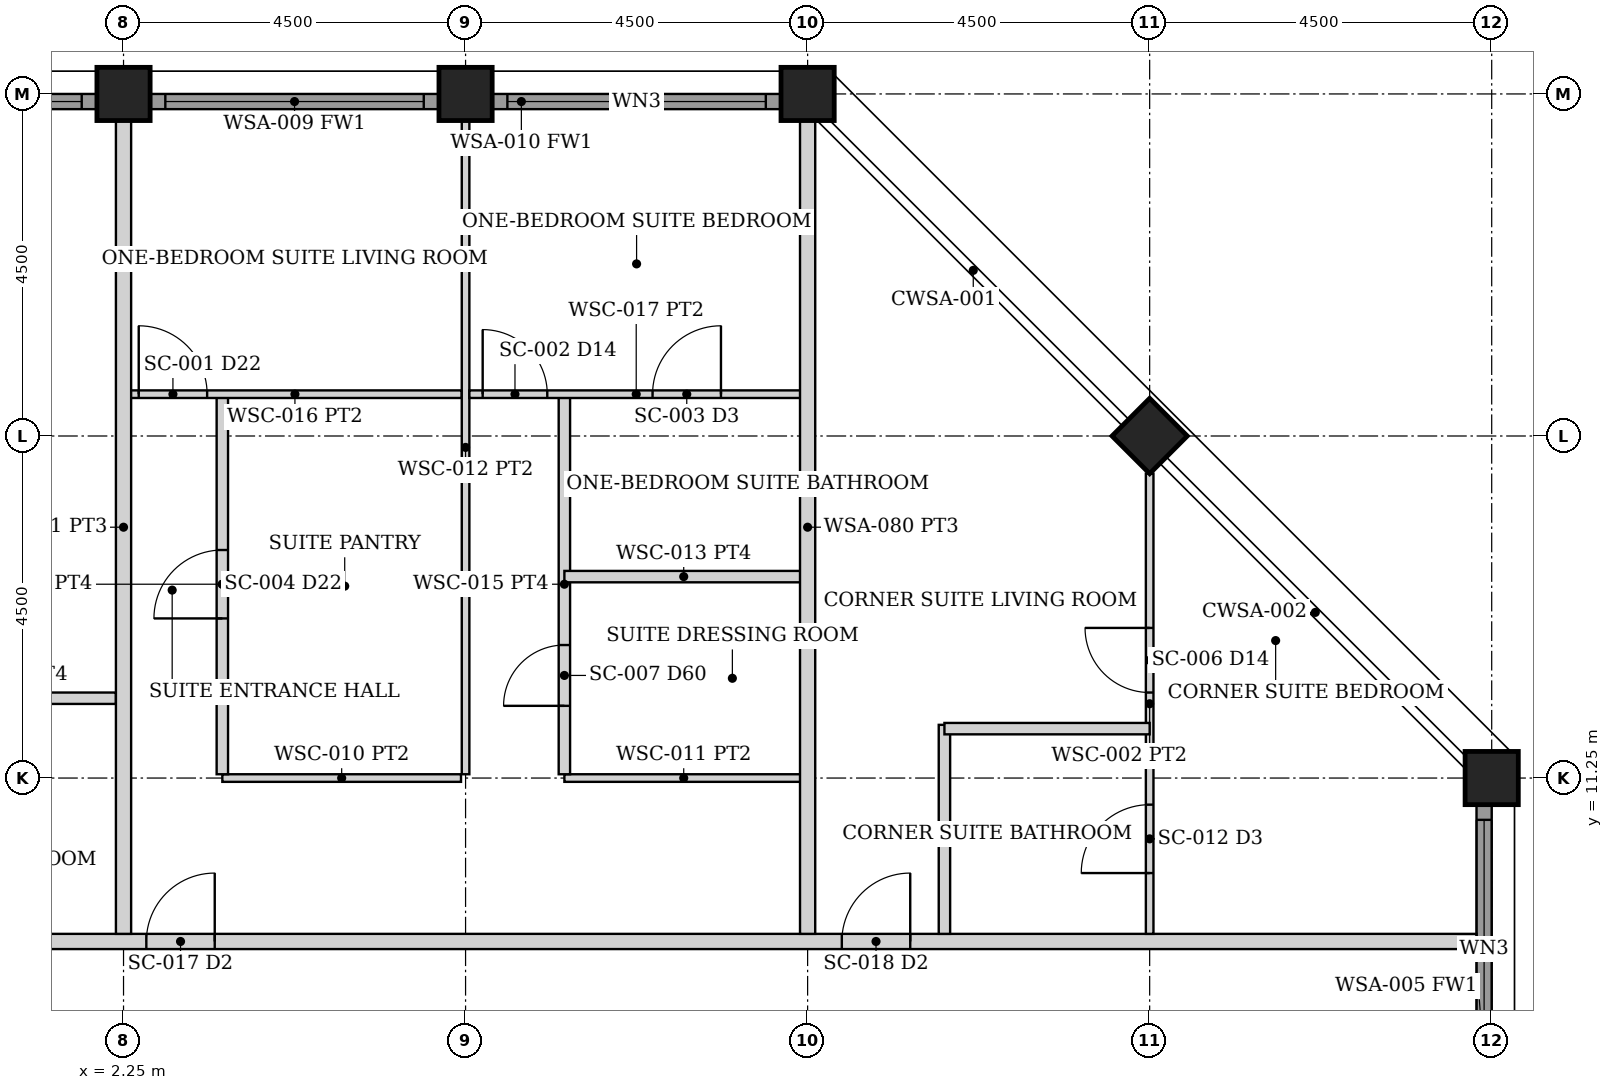
"""IFC4 building model, lengths in metres.
Left out: names, types, materials, properties, quantities, classifications, styles, units other than length and angle.
Written with IfcOpenShell. Run it as: python <this file> out.ifc"""

import sys

from ifc_helpers import new_model, si_unit, direction, frame, frame_2d, origin, origin_2d, place, context, subcontext, project, spatial, rectangle, hollow_rectangle, extrude, element, fill, save


model = new_model("IFC4")
c1 = context("Model", 3, precision=1e-05, world=origin(), true_north=direction((0.0, 1.0)))
c2 = subcontext(c1, "Body", "Model", "MODEL_VIEW")
j1 = project(units=[si_unit("LENGTHUNIT", "METRE"), si_unit("PLANEANGLEUNIT", "RADIAN")], contexts=[c1])
p1 = place(None, origin())
s1 = spatial("IfcSite", under=j1, at=p1, CompositionType="ELEMENT")
p2 = place(p1, origin())
s2 = spatial("IfcBuilding", under=s1, at=p2, CompositionType="ELEMENT")
p3 = place(p2, frame((0.0, 0.0, 223.3)))
s3 = spatial("IfcBuildingStorey", under=s2, at=p3, CompositionType="ELEMENT", Elevation=223.3)
for number, where, z_axis, x_axis in (
    (1, (2.25, 20.25, 0.0), (0.0, 0.0, 1.0), (0.0, 1.0, 0.0)),
    (2, (6.75, 20.25, 0.0), (0.0, 0.0, 1.0), (0.0, 1.0, 0.0)),
    (3, (11.25, 20.25, 0.0), (0.0, 0.0, 1.0), (0.0, 1.0, 0.0)),
    (4, (20.25, 11.25, 0.0), (0.0, 0.0, 1.0), (1.0, 0.0, 0.0)),
    (5, (15.75, 15.75, 0.0), (0.0, 0.0, 1.0), (0.707, 0.707, 0.0)),
):
    element("IfcColumn", number, at=place(p3, frame(where, z_axis=z_axis, x_axis=x_axis)), inside=s3, PredefinedType="COLUMN", context=c2, shape_type="SweptSolid", body=[
        extrude(hollow_rectangle(XDim=0.7, YDim=0.7, WallThickness=0.04, at=origin_2d()), origin(), (0.0, 0.0, 1.0), 3.75),
    ])
p4 = place(p3, frame((20.15, 7.105, 0.0), z_axis=(0.0, 0.0, 1.0), x_axis=(0.0, 1.0, 0.0)))
e6 = element("IfcWall", 6, at=p4, inside=s3, PredefinedType="SOLIDWALL", context=c2, shape_type="SweptSolid", body=[
    extrude(rectangle(XDim=3.79, YDim=0.2, at=frame_2d((1.895, 0.0))), origin(), (0.0, 0.0, 1.0), 2.629),
])
p5 = place(p4, frame((0.195, 0.0, 0.3)))
e7 = element("IfcOpeningElement", 7, at=p5, cuts=e6, PredefinedType="OPENING", context=c2, shape_type="SweptSolid", body=[
    extrude(rectangle(XDim=3.4, YDim=2.179, at=frame_2d((1.7, 1.089))), frame((0.0, 0.11, 0.0), z_axis=(0.0, -1.0, 0.0), x_axis=(1.0, 0.0, 0.0)), (0.0, 0.0, 1.0), 0.22),
])
p6 = place(p3, frame((-1.895, 20.15, 0.0), z_axis=(0.0, 0.0, 1.0), x_axis=(1.0, 0.0, 0.0)))
e8 = element("IfcWall", 8, at=p6, inside=s3, PredefinedType="SOLIDWALL", context=c2, shape_type="SweptSolid", body=[
    extrude(rectangle(XDim=3.79, YDim=0.2, at=frame_2d((1.895, 0.0))), origin(), (0.0, 0.0, 1.0), 2.629),
])
p7 = place(p6, frame((0.195, 0.0, 0.3)))
e9 = element("IfcOpeningElement", 9, at=p7, cuts=e8, PredefinedType="OPENING", context=c2, shape_type="SweptSolid", body=[
    extrude(rectangle(XDim=3.4, YDim=2.179, at=frame_2d((1.7, 1.089))), frame((0.0, 0.11, 0.0), z_axis=(0.0, -1.0, 0.0), x_axis=(1.0, 0.0, 0.0)), (0.0, 0.0, 1.0), 0.22),
])
p8 = place(p3, frame((2.605, 20.15, 0.0), z_axis=(0.0, 0.0, 1.0), x_axis=(1.0, 0.0, 0.0)))
e10 = element("IfcWall", 10, at=p8, inside=s3, PredefinedType="SOLIDWALL", context=c2, shape_type="SweptSolid", body=[
    extrude(rectangle(XDim=3.79, YDim=0.2, at=frame_2d((1.895, 0.0))), origin(), (0.0, 0.0, 1.0), 2.629),
])
p9 = place(p8, frame((0.195, 0.0, 0.3)))
e11 = element("IfcOpeningElement", 11, at=p9, cuts=e10, PredefinedType="OPENING", context=c2, shape_type="SweptSolid", body=[
    extrude(rectangle(XDim=3.4, YDim=2.179, at=frame_2d((1.7, 1.089))), frame((0.0, 0.11, 0.0), z_axis=(0.0, -1.0, 0.0), x_axis=(1.0, 0.0, 0.0)), (0.0, 0.0, 1.0), 0.22),
])
p10 = place(p3, frame((7.105, 20.15, 0.0), z_axis=(0.0, 0.0, 1.0), x_axis=(1.0, 0.0, 0.0)))
e12 = element("IfcWall", 12, at=p10, inside=s3, PredefinedType="SOLIDWALL", context=c2, shape_type="SweptSolid", body=[
    extrude(rectangle(XDim=3.79, YDim=0.2, at=frame_2d((1.895, 0.0))), origin(), (0.0, 0.0, 1.0), 2.629),
])
p11 = place(p10, frame((0.195, 0.0, 0.3)))
e13 = element("IfcOpeningElement", 13, at=p11, cuts=e12, PredefinedType="OPENING", context=c2, shape_type="SweptSolid", body=[
    extrude(rectangle(XDim=3.4, YDim=2.179, at=frame_2d((1.7, 1.089))), frame((0.0, 0.11, 0.0), z_axis=(0.0, -1.0, 0.0), x_axis=(1.0, 0.0, 0.0)), (0.0, 0.0, 1.0), 0.22),
])
p12 = place(p3, frame((-20.05, 9.1, 0.0), z_axis=(0.0, 0.0, 1.0), x_axis=(1.0, 0.0, 0.0)))
e14 = element("IfcWall", 14, at=p12, inside=s3, PredefinedType="PARTITIONING", context=c2, shape_type="SweptSolid", body=[
    extrude(rectangle(XDim=40.1, YDim=0.2, at=frame_2d((20.05, 0.0))), origin(), (0.0, 0.0, 1.0), 2.629),
])
p13 = place(p12, frame((9.0, 0.0, 0.0)))
e15 = element("IfcOpeningElement", 15, at=p13, cuts=e14, PredefinedType="OPENING", context=c2, shape_type="SweptSolid", body=[
    extrude(rectangle(XDim=0.9, YDim=2.1, at=frame_2d((0.45, 1.05))), frame((0.0, 0.11, 0.0), z_axis=(0.0, -1.0, 0.0), x_axis=(1.0, 0.0, 0.0)), (0.0, 0.0, 1.0), 0.22),
])
p14 = place(p12, frame((16.7, 0.0, 0.0)))
e16 = element("IfcOpeningElement", 16, at=p14, cuts=e14, PredefinedType="OPENING", context=c2, shape_type="SweptSolid", body=[
    extrude(rectangle(XDim=0.9, YDim=2.1, at=frame_2d((0.45, 1.05))), frame((0.0, 0.11, 0.0), z_axis=(0.0, -1.0, 0.0), x_axis=(1.0, 0.0, 0.0)), (0.0, 0.0, 1.0), 0.22),
])
p15 = place(p12, frame((18.0, 0.0, 0.0)))
e17 = element("IfcOpeningElement", 17, at=p15, cuts=e14, PredefinedType="OPENING", context=c2, shape_type="SweptSolid", body=[
    extrude(rectangle(XDim=0.9, YDim=2.1, at=frame_2d((0.45, 1.05))), frame((0.0, 0.11, 0.0), z_axis=(0.0, -1.0, 0.0), x_axis=(1.0, 0.0, 0.0)), (0.0, 0.0, 1.0), 0.22),
])
p16 = place(p12, frame((22.6, 0.0, 0.0)))
e18 = element("IfcOpeningElement", 18, at=p16, cuts=e14, PredefinedType="OPENING", context=c2, shape_type="SweptSolid", body=[
    extrude(rectangle(XDim=0.9, YDim=2.1, at=frame_2d((0.45, 1.05))), frame((0.0, 0.11, 0.0), z_axis=(0.0, -1.0, 0.0), x_axis=(1.0, 0.0, 0.0)), (0.0, 0.0, 1.0), 0.22),
])
p17 = place(p12, frame((31.75, 0.0, 0.0)))
e19 = element("IfcOpeningElement", 19, at=p17, cuts=e14, PredefinedType="OPENING", context=c2, shape_type="SweptSolid", body=[
    extrude(rectangle(XDim=0.9, YDim=2.1, at=frame_2d((0.45, 1.05))), frame((0.0, 0.11, 0.0), z_axis=(0.0, -1.0, 0.0), x_axis=(1.0, 0.0, 0.0)), (0.0, 0.0, 1.0), 0.22),
])
p18 = place(p12, frame((7.45, 0.0, 0.0)))
e20 = element("IfcOpeningElement", 20, at=p18, cuts=e14, PredefinedType="OPENING", context=c2, shape_type="SweptSolid", body=[
    extrude(rectangle(XDim=0.9, YDim=2.1, at=frame_2d((0.45, 1.05))), frame((0.0, 0.11, 0.0), z_axis=(0.0, -1.0, 0.0), x_axis=(1.0, 0.0, 0.0)), (0.0, 0.0, 1.0), 0.22),
])
p19 = place(p3, frame((-0.9, 12.3, 0.0), z_axis=(0.0, 0.0, 1.0), x_axis=(1.0, 0.0, 0.0)))
e21 = element("IfcWall", 21, at=p19, inside=s3, PredefinedType="PARTITIONING", context=c2, shape_type="SweptSolid", body=[
    extrude(rectangle(XDim=3.05, YDim=0.15, at=frame_2d((1.525, 0.0))), origin(), (0.0, 0.0, 1.0), 2.629),
])
p20 = place(p3, frame((3.55, 11.25, 0.0), z_axis=(0.0, 0.0, 1.0), x_axis=(1.0, 0.0, 0.0)))
e22 = element("IfcWall", 22, at=p20, inside=s3, PredefinedType="PARTITIONING", context=c2, shape_type="SweptSolid", body=[
    extrude(rectangle(XDim=3.14, YDim=0.1, at=frame_2d((1.57, 0.0))), origin(), (0.0, 0.0, 1.0), 2.629),
])
p21 = place(p3, frame((3.55, 11.3, 0.0), z_axis=(0.0, 0.0, 1.0), x_axis=(0.0, 1.0, 0.0)))
e23 = element("IfcWall", 23, at=p21, inside=s3, PredefinedType="PARTITIONING", context=c2, shape_type="SweptSolid", body=[
    extrude(rectangle(XDim=5.0, YDim=0.15, at=frame_2d((2.5, 0.0))), origin(), (0.0, 0.0, 1.0), 2.629),
])
p22 = place(p21, frame((2.05, 0.0, 0.0)))
e24 = element("IfcOpeningElement", 24, at=p22, cuts=e23, PredefinedType="OPENING", context=c2, shape_type="SweptSolid", body=[
    extrude(rectangle(XDim=0.9, YDim=2.1, at=frame_2d((0.45, 1.05))), frame((0.0, 0.085, 0.0), z_axis=(0.0, -1.0, 0.0), x_axis=(1.0, 0.0, 0.0)), (0.0, 0.0, 1.0), 0.17),
])
p23 = place(p3, frame((2.31, 16.3, 0.0), z_axis=(0.0, 0.0, 1.0), x_axis=(1.0, 0.0, 0.0)))
e25 = element("IfcWall", 25, at=p23, inside=s3, PredefinedType="PARTITIONING", context=c2, shape_type="SweptSolid", body=[
    extrude(rectangle(XDim=4.39, YDim=0.1, at=frame_2d((2.195, 0.0))), origin(), (0.0, 0.0, 1.0), 2.629),
])
p24 = place(p23, frame((0.14, 0.0, 0.0)))
e26 = element("IfcOpeningElement", 26, at=p24, cuts=e25, PredefinedType="OPENING", context=c2, shape_type="SweptSolid", body=[
    extrude(rectangle(XDim=0.9, YDim=2.1, at=frame_2d((0.45, 1.05))), frame((0.0, 0.06, 0.0), z_axis=(0.0, -1.0, 0.0), x_axis=(1.0, 0.0, 0.0)), (0.0, 0.0, 1.0), 0.12),
])
p25 = place(p3, frame((6.75, 11.3, 0.0), z_axis=(0.0, 0.0, 1.0), x_axis=(0.0, 1.0, 0.0)))
e27 = element("IfcWall", 27, at=p25, inside=s3, PredefinedType="PARTITIONING", context=c2, shape_type="SweptSolid", body=[
    extrude(rectangle(XDim=8.6, YDim=0.1, at=frame_2d((4.3, 0.0))), origin(), (0.0, 0.0, 1.0), 2.629),
])
p26 = place(p3, frame((8.05, 11.25, 0.0), z_axis=(0.0, 0.0, 1.0), x_axis=(1.0, 0.0, 0.0)))
e28 = element("IfcWall", 28, at=p26, inside=s3, PredefinedType="PARTITIONING", context=c2, shape_type="SweptSolid", body=[
    extrude(rectangle(XDim=3.14, YDim=0.1, at=frame_2d((1.57, 0.0))), origin(), (0.0, 0.0, 1.0), 2.629),
])
p27 = place(p3, frame((8.05, 11.3, 0.0), z_axis=(0.0, 0.0, 1.0), x_axis=(0.0, 1.0, 0.0)))
e29 = element("IfcWall", 29, at=p27, inside=s3, PredefinedType="PARTITIONING", context=c2, shape_type="SweptSolid", body=[
    extrude(rectangle(XDim=5.0, YDim=0.15, at=frame_2d((2.5, 0.0))), origin(), (0.0, 0.0, 1.0), 2.629),
])
p28 = place(p27, frame((0.9, 0.0, 0.0)))
e30 = element("IfcOpeningElement", 30, at=p28, cuts=e29, PredefinedType="OPENING", context=c2, shape_type="SweptSolid", body=[
    extrude(rectangle(XDim=0.8, YDim=2.1, at=frame_2d((0.4, 1.05))), frame((0.0, 0.085, 0.0), z_axis=(0.0, -1.0, 0.0), x_axis=(1.0, 0.0, 0.0)), (0.0, 0.0, 1.0), 0.17),
])
p29 = place(p3, frame((6.8, 16.3, 0.0), z_axis=(0.0, 0.0, 1.0), x_axis=(1.0, 0.0, 0.0)))
e31 = element("IfcWall", 31, at=p29, inside=s3, PredefinedType="PARTITIONING", context=c2, shape_type="SweptSolid", body=[
    extrude(rectangle(XDim=4.39, YDim=0.1, at=frame_2d((2.195, 0.0))), origin(), (0.0, 0.0, 1.0), 2.629),
])
p30 = place(p29, frame((0.175, 0.0, 0.0)))
e32 = element("IfcOpeningElement", 32, at=p30, cuts=e31, PredefinedType="OPENING", context=c2, shape_type="SweptSolid", body=[
    extrude(rectangle(XDim=0.85, YDim=2.1, at=frame_2d((0.425, 1.05))), frame((0.0, 0.06, 0.0), z_axis=(0.0, -1.0, 0.0), x_axis=(1.0, 0.0, 0.0)), (0.0, 0.0, 1.0), 0.12),
])
p31 = place(p29, frame((2.41, 0.0, 0.0)))
e33 = element("IfcOpeningElement", 33, at=p31, cuts=e31, PredefinedType="OPENING", context=c2, shape_type="SweptSolid", body=[
    extrude(rectangle(XDim=0.9, YDim=2.1, at=frame_2d((0.45, 1.05))), frame((0.0, 0.06, 0.0), z_axis=(0.0, -1.0, 0.0), x_axis=(1.0, 0.0, 0.0)), (0.0, 0.0, 1.0), 0.12),
])
p32 = place(p3, frame((8.05, 13.9, 0.0), z_axis=(0.0, 0.0, 1.0), x_axis=(1.0, 0.0, 0.0)))
e34 = element("IfcWall", 34, at=p32, inside=s3, PredefinedType="PARTITIONING", context=c2, shape_type="SweptSolid", body=[
    extrude(rectangle(XDim=3.14, YDim=0.15, at=frame_2d((1.57, 0.0))), origin(), (0.0, 0.0, 1.0), 2.629),
])
for number, where, z_axis, x_axis in (
    (35, (2.25, 9.2, 0.0), (0.0, 0.0, 1.0), (0.0, 1.0, 0.0)),
    (36, (11.25, 9.2, 0.0), (0.0, 0.0, 1.0), (0.0, 1.0, 0.0)),
):
    element("IfcWall", number, at=place(p3, frame(where, z_axis=z_axis, x_axis=x_axis)), inside=s3, PredefinedType="PARTITIONING", context=c2, shape_type="SweptSolid", body=[
        extrude(rectangle(XDim=10.7, YDim=0.2, at=frame_2d((5.35, 0.0))), origin(), (0.0, 0.0, 1.0), 2.629),
    ])
p33 = place(p3, frame((15.75, 9.2, 0.0), z_axis=(0.0, 0.0, 1.0), x_axis=(0.0, 1.0, 0.0)))
e37 = element("IfcWall", 37, at=p33, inside=s3, PredefinedType="PARTITIONING", context=c2, shape_type="SweptSolid", body=[
    extrude(rectangle(XDim=6.055, YDim=0.1, at=frame_2d((3.027, 0.0))), origin(), (0.0, 0.0, 1.0), 2.629),
])
p34 = place(p33, frame((3.175, 0.0, 0.0)))
e38 = element("IfcOpeningElement", 38, at=p34, cuts=e37, PredefinedType="OPENING", context=c2, shape_type="SweptSolid", body=[
    extrude(rectangle(XDim=0.85, YDim=2.1, at=frame_2d((0.425, 1.05))), frame((0.0, 0.06, 0.0), z_axis=(0.0, -1.0, 0.0), x_axis=(1.0, 0.0, 0.0)), (0.0, 0.0, 1.0), 0.12),
])
p35 = place(p33, frame((0.8, 0.0, 0.0)))
e39 = element("IfcOpeningElement", 39, at=p35, cuts=e37, PredefinedType="OPENING", context=c2, shape_type="SweptSolid", body=[
    extrude(rectangle(XDim=0.9, YDim=2.1, at=frame_2d((0.45, 1.05))), frame((0.0, 0.06, 0.0), z_axis=(0.0, -1.0, 0.0), x_axis=(1.0, 0.0, 0.0)), (0.0, 0.0, 1.0), 0.12),
])
p36 = place(p3, frame((13.05, 9.2, 0.0), z_axis=(0.0, 0.0, 1.0), x_axis=(0.0, 1.0, 0.0)))
e40 = element("IfcWall", 40, at=p36, inside=s3, PredefinedType="PARTITIONING", context=c2, shape_type="SweptSolid", body=[
    extrude(rectangle(XDim=2.75, YDim=0.15, at=frame_2d((1.375, 0.0))), origin(), (0.0, 0.0, 1.0), 2.629),
])
p37 = place(p3, frame((13.05, 11.9, 0.0), z_axis=(0.0, 0.0, 1.0), x_axis=(1.0, 0.0, 0.0)))
e41 = element("IfcWall", 41, at=p37, inside=s3, PredefinedType="PARTITIONING", context=c2, shape_type="SweptSolid", body=[
    extrude(rectangle(XDim=2.7, YDim=0.15, at=frame_2d((1.35, 0.0))), origin(), (0.0, 0.0, 1.0), 2.629),
])
p38 = place(p5, origin())
e42 = element("IfcWindow", 42, at=p38, inside=s3, PartitioningType="SINGLE_PANEL", PredefinedType="WINDOW", context=c2, shape_type="SweptSolid", body=[
    extrude(rectangle(XDim=3.4, YDim=2.179, at=frame_2d((1.7, 1.089))), frame((0.0, 0.03, 0.0), z_axis=(0.0, -1.0, 0.0), x_axis=(1.0, 0.0, 0.0)), (0.0, 0.0, 1.0), 0.06),
])
fill(e7, e42)
p39 = place(p7, origin())
e43 = element("IfcWindow", 43, at=p39, inside=s3, PartitioningType="SINGLE_PANEL", PredefinedType="WINDOW", context=c2, shape_type="SweptSolid", body=[
    extrude(rectangle(XDim=3.4, YDim=2.179, at=frame_2d((1.7, 1.089))), frame((0.0, 0.03, 0.0), z_axis=(0.0, -1.0, 0.0), x_axis=(1.0, 0.0, 0.0)), (0.0, 0.0, 1.0), 0.06),
])
fill(e9, e43)
p40 = place(p9, origin())
e44 = element("IfcWindow", 44, at=p40, inside=s3, PartitioningType="SINGLE_PANEL", PredefinedType="WINDOW", context=c2, shape_type="SweptSolid", body=[
    extrude(rectangle(XDim=3.4, YDim=2.179, at=frame_2d((1.7, 1.089))), frame((0.0, 0.03, 0.0), z_axis=(0.0, -1.0, 0.0), x_axis=(1.0, 0.0, 0.0)), (0.0, 0.0, 1.0), 0.06),
])
fill(e11, e44)
p41 = place(p11, origin())
e45 = element("IfcWindow", 45, at=p41, inside=s3, PartitioningType="SINGLE_PANEL", PredefinedType="WINDOW", context=c2, shape_type="SweptSolid", body=[
    extrude(rectangle(XDim=3.4, YDim=2.179, at=frame_2d((1.7, 1.089))), frame((0.0, 0.03, 0.0), z_axis=(0.0, -1.0, 0.0), x_axis=(1.0, 0.0, 0.0)), (0.0, 0.0, 1.0), 0.06),
])
fill(e13, e45)
p42 = place(p16, origin())
e46 = element("IfcDoor", 46, at=p42, inside=s3, OperationType="SINGLE_SWING_RIGHT", PredefinedType="DOOR", context=c2, shape_type="SweptSolid", body=[
    extrude(rectangle(XDim=0.9, YDim=2.1, at=frame_2d((0.45, 1.05))), frame((0.0, 0.025, 0.0), z_axis=(0.0, -1.0, 0.0), x_axis=(1.0, 0.0, 0.0)), (0.0, 0.0, 1.0), 0.05),
])
fill(e18, e46)
p43 = place(p22, origin())
e47 = element("IfcDoor", 47, at=p43, inside=s3, OperationType="SINGLE_SWING_LEFT", PredefinedType="DOOR", context=c2, shape_type="SweptSolid", body=[
    extrude(rectangle(XDim=0.9, YDim=2.1, at=frame_2d((0.45, 1.05))), frame((0.0, 0.025, 0.0), z_axis=(0.0, -1.0, 0.0), x_axis=(1.0, 0.0, 0.0)), (0.0, 0.0, 1.0), 0.05),
])
fill(e24, e47)
p44 = place(p24, origin())
e48 = element("IfcDoor", 48, at=p44, inside=s3, OperationType="SINGLE_SWING_LEFT", PredefinedType="DOOR", context=c2, shape_type="SweptSolid", body=[
    extrude(rectangle(XDim=0.9, YDim=2.1, at=frame_2d((0.45, 1.05))), frame((0.0, 0.025, 0.0), z_axis=(0.0, -1.0, 0.0), x_axis=(1.0, 0.0, 0.0)), (0.0, 0.0, 1.0), 0.05),
])
fill(e26, e48)
p45 = place(p30, origin())
e49 = element("IfcDoor", 49, at=p45, inside=s3, OperationType="SINGLE_SWING_LEFT", PredefinedType="DOOR", context=c2, shape_type="SweptSolid", body=[
    extrude(rectangle(XDim=0.85, YDim=2.1, at=frame_2d((0.425, 1.05))), frame((0.0, 0.025, 0.0), z_axis=(0.0, -1.0, 0.0), x_axis=(1.0, 0.0, 0.0)), (0.0, 0.0, 1.0), 0.05),
])
fill(e32, e49)
p46 = place(p28, origin())
e50 = element("IfcDoor", 50, at=p46, inside=s3, OperationType="SINGLE_SWING_LEFT", PredefinedType="DOOR", context=c2, shape_type="SweptSolid", body=[
    extrude(rectangle(XDim=0.8, YDim=2.1, at=frame_2d((0.4, 1.05))), frame((0.0, 0.025, 0.0), z_axis=(0.0, -1.0, 0.0), x_axis=(1.0, 0.0, 0.0)), (0.0, 0.0, 1.0), 0.05),
])
fill(e30, e50)
p47 = place(p31, origin())
e51 = element("IfcDoor", 51, at=p47, inside=s3, OperationType="SINGLE_SWING_RIGHT", PredefinedType="DOOR", context=c2, shape_type="SweptSolid", body=[
    extrude(rectangle(XDim=0.9, YDim=2.1, at=frame_2d((0.45, 1.05))), frame((0.0, 0.025, 0.0), z_axis=(0.0, -1.0, 0.0), x_axis=(1.0, 0.0, 0.0)), (0.0, 0.0, 1.0), 0.05),
])
fill(e33, e51)
p48 = place(p17, origin())
e52 = element("IfcDoor", 52, at=p48, inside=s3, OperationType="SINGLE_SWING_RIGHT", PredefinedType="DOOR", context=c2, shape_type="SweptSolid", body=[
    extrude(rectangle(XDim=0.9, YDim=2.1, at=frame_2d((0.45, 1.05))), frame((0.0, 0.025, 0.0), z_axis=(0.0, -1.0, 0.0), x_axis=(1.0, 0.0, 0.0)), (0.0, 0.0, 1.0), 0.05),
])
fill(e19, e52)
p49 = place(p34, origin())
e53 = element("IfcDoor", 53, at=p49, inside=s3, OperationType="SINGLE_SWING_RIGHT", PredefinedType="DOOR", context=c2, shape_type="SweptSolid", body=[
    extrude(rectangle(XDim=0.85, YDim=2.1, at=frame_2d((0.425, 1.05))), frame((0.0, 0.025, 0.0), z_axis=(0.0, -1.0, 0.0), x_axis=(1.0, 0.0, 0.0)), (0.0, 0.0, 1.0), 0.05),
])
fill(e38, e53)
p50 = place(p35, origin())
e54 = element("IfcDoor", 54, at=p50, inside=s3, OperationType="SINGLE_SWING_LEFT", PredefinedType="DOOR", context=c2, shape_type="SweptSolid", body=[
    extrude(rectangle(XDim=0.9, YDim=2.1, at=frame_2d((0.45, 1.05))), frame((0.0, 0.025, 0.0), z_axis=(0.0, -1.0, 0.0), x_axis=(1.0, 0.0, 0.0)), (0.0, 0.0, 1.0), 0.05),
])
fill(e39, e54)
save(model, sys.argv[1])
